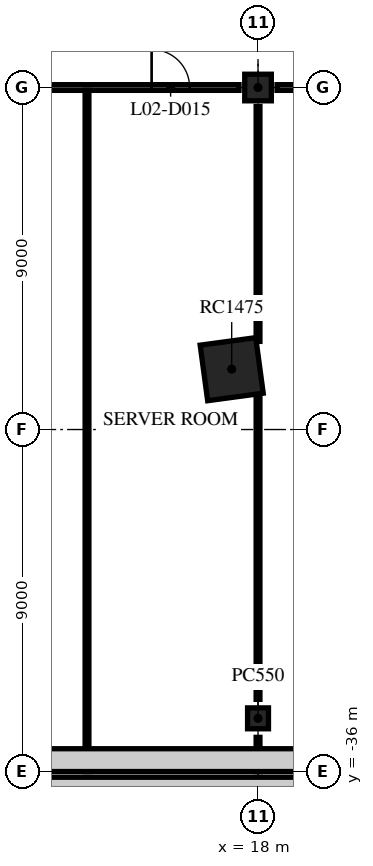
"""IFC4 building model, lengths in metres.
Left out: names, types, materials, properties, quantities, classifications, styles, units other than length and angle.
Written with IfcOpenShell. Run it as: python <this file> out.ifc"""

import sys

from ifc_helpers import new_model, si_unit, direction, frame, frame_2d, origin, origin_2d, place, context, subcontext, project, spatial, rectangle, extrude, element, fill, save


model = new_model("IFC4")
c1 = context("Model", 3, precision=1e-05, world=origin(), true_north=direction((0.0, 1.0)))
c2 = subcontext(c1, "Body", "Model", "MODEL_VIEW")
j1 = project(units=[si_unit("LENGTHUNIT", "METRE"), si_unit("PLANEANGLEUNIT", "RADIAN")], contexts=[c1])
p1 = place(None, origin())
s1 = spatial("IfcSite", under=j1, at=p1, CompositionType="ELEMENT")
p2 = place(p1, origin())
s2 = spatial("IfcBuilding", under=s1, at=p2, CompositionType="ELEMENT")
p3 = place(p2, frame((0.0, 0.0, 9.0)))
s3 = spatial("IfcBuildingStorey", under=s2, at=p3, CompositionType="ELEMENT", Elevation=9.0)
p4 = place(p3, frame((18.0, -34.6, 0.0), z_axis=(0.0, 0.0, 1.0), x_axis=(1.0, 0.0, 0.0)))
e1 = element("IfcColumn", 1, at=p4, inside=s3, PredefinedType="COLUMN", context=c2, shape_type="SweptSolid", body=[
    extrude(rectangle(XDim=0.55, YDim=0.55, at=origin_2d()), origin(), (0.0, 0.0, 1.0), 4.5),
])
p5 = place(p3, frame((18.0, -18.0, 0.0), z_axis=(0.0, 0.0, 1.0), x_axis=(1.0, 0.0, 0.0)))
e2 = element("IfcColumn", 2, at=p5, inside=s3, PredefinedType="COLUMN", context=c2, shape_type="SweptSolid", body=[
    extrude(rectangle(XDim=0.7, YDim=0.7, at=origin_2d()), origin(), (0.0, 0.0, 1.0), 4.5),
])
p6 = place(p3, frame((17.307, -25.412, 0.0), z_axis=(0.0, 0.0, 1.0), x_axis=(0.991001197216, 0.133853005627, 0.0)))
e3 = element("IfcColumn", 3, at=p6, inside=s3, PredefinedType="COLUMN", context=c2, shape_type="SweptSolid", body=[
    extrude(rectangle(XDim=1.475, YDim=1.475, at=origin_2d()), origin(), (0.0, 0.0, 1.0), 4.5),
])
p7 = place(p3, frame((9.5, -18.0, 0.0), z_axis=(0.0, 0.0, 1.0), x_axis=(1.0, 0.0, 0.0)))
e4 = element("IfcWall", 4, at=p7, inside=s3, PredefinedType="PARTITIONING", context=c2, shape_type="SweptSolid", body=[
    extrude(rectangle(XDim=8.0, YDim=0.15, at=frame_2d((4.0, 0.0))), origin(), (0.0, 0.0, 1.0), 4.1),
])
p8 = place(p7, frame((5.7, 0.0, 0.0)))
e5 = element("IfcOpeningElement", 5, at=p8, cuts=e4, PredefinedType="OPENING", context=c2, shape_type="SweptSolid", body=[
    extrude(rectangle(XDim=1.0, YDim=2.1, at=frame_2d((0.5, 1.05))), frame((0.0, 0.085, 0.0), z_axis=(0.0, -1.0, 0.0), x_axis=(1.0, 0.0, 0.0)), (0.0, 0.0, 1.0), 0.17),
])
p9 = place(p3, frame((18.5, -18.0, 0.0), z_axis=(0.0, 0.0, 1.0), x_axis=(1.0, 0.0, 0.0)))
e6 = element("IfcWall", 6, at=p9, inside=s3, PredefinedType="PARTITIONING", context=c2, shape_type="SweptSolid", body=[
    extrude(rectangle(XDim=8.0, YDim=0.15, at=frame_2d((4.0, 0.0))), origin(), (0.0, 0.0, 1.0), 4.1),
])
p10 = place(p9, frame((6.6, 0.0, 0.0)))
e7 = element("IfcOpeningElement", 7, at=p10, cuts=e6, PredefinedType="OPENING", context=c2, shape_type="SweptSolid", body=[
    extrude(rectangle(XDim=1.0, YDim=2.1, at=frame_2d((0.5, 1.05))), frame((0.0, 0.085, 0.0), z_axis=(0.0, -1.0, 0.0), x_axis=(1.0, 0.0, 0.0)), (0.0, 0.0, 1.0), 0.17),
])
p11 = place(p3, frame((13.5, -36.0, 0.0), z_axis=(0.0, 0.0, 1.0), x_axis=(0.0, 1.0, 0.0)))
e8 = element("IfcWall", 8, at=p11, inside=s3, PredefinedType="PARTITIONING", context=c2, shape_type="SweptSolid", body=[
    extrude(rectangle(XDim=17.925, YDim=0.1, at=frame_2d((8.962, 0.0))), origin(), (0.0, 0.0, 1.0), 4.1),
])
p12 = place(p3, frame((18.0, -36.0, 0.0), z_axis=(0.0, 0.0, 1.0), x_axis=(0.0, 1.0, 0.0)))
e9 = element("IfcWall", 9, at=p12, inside=s3, PredefinedType="PARTITIONING", context=c2, shape_type="SweptSolid", body=[
    extrude(rectangle(XDim=0.9, YDim=0.1, at=frame_2d((0.45, 0.0))), origin(), (0.0, 0.0, 1.0), 4.1),
])
p13 = place(p3, frame((18.0, -34.1, 0.0), z_axis=(0.0, 0.0, 1.0), x_axis=(0.0, 1.0, 0.0)))
e10 = element("IfcWall", 10, at=p13, inside=s3, PredefinedType="PARTITIONING", context=c2, shape_type="SweptSolid", body=[
    extrude(rectangle(XDim=7.957, YDim=0.1, at=frame_2d((3.979, 0.0))), origin(), (0.0, 0.0, 1.0), 4.1),
])
p14 = place(p3, frame((18.0, -24.681, 0.0), z_axis=(0.0, 0.0, 1.0), x_axis=(0.0, 1.0, 0.0)))
e11 = element("IfcWall", 11, at=p14, inside=s3, PredefinedType="PARTITIONING", context=c2, shape_type="SweptSolid", body=[
    extrude(rectangle(XDim=6.181, YDim=0.1, at=frame_2d((3.09, 0.0))), origin(), (0.0, 0.0, 1.0), 4.1),
])
p15 = place(p3, frame((4.083, -36.3, 0.0), z_axis=(0.0, 0.0, 1.0), x_axis=(1.0, 0.0, 0.0)))
e12 = element("IfcWall", 12, at=p15, inside=s3, PredefinedType="PARAPET", context=c2, shape_type="SweptSolid", body=[
    extrude(rectangle(XDim=31.767, YDim=0.3, at=frame_2d((15.884, 0.0))), origin(), (0.0, 0.0, 1.0), 1.1),
])
p16 = place(p3, frame((-30.876, -35.7, 0.0), z_axis=(0.0, 0.0, 1.0), x_axis=(1.0, 0.0, 0.0)))
e13 = element("IfcWall", 13, at=p16, inside=s3, PredefinedType="STANDARD", context=c2, shape_type="SweptSolid", body=[
    extrude(rectangle(XDim=61.751, YDim=0.6, at=frame_2d((30.876, 0.0))), origin(), (0.0, 0.0, 1.0), 4.1),
])
p17 = place(p8, origin())
e14 = element("IfcDoor", 14, at=p17, inside=s3, OperationType="SINGLE_SWING_LEFT", PredefinedType="DOOR", context=c2, shape_type="SweptSolid", body=[
    extrude(rectangle(XDim=1.0, YDim=2.1, at=frame_2d((0.5, 1.05))), frame((0.0, 0.025, 0.0), z_axis=(0.0, -1.0, 0.0), x_axis=(1.0, 0.0, 0.0)), (0.0, 0.0, 1.0), 0.05),
])
fill(e5, e14)
save(model, sys.argv[1])
